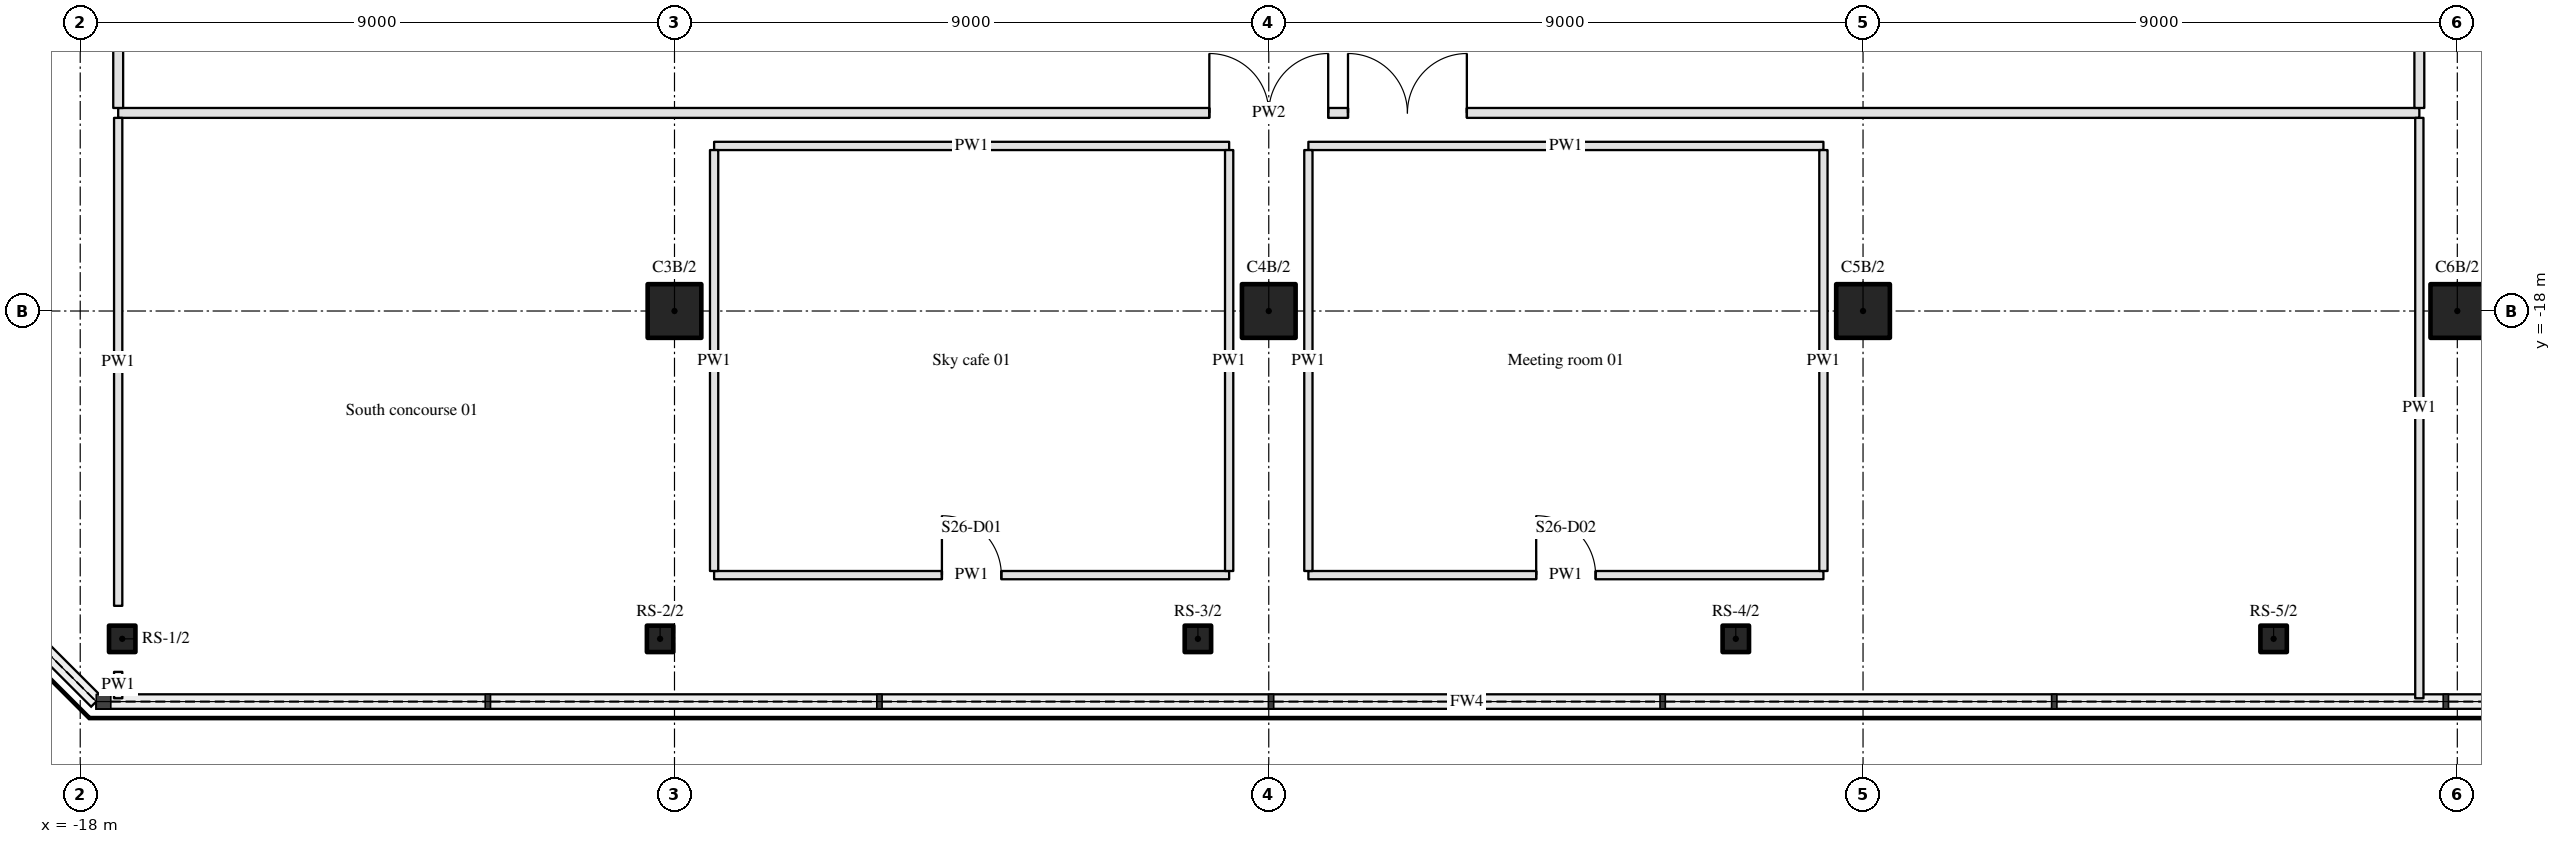
"""IFC4 building model, lengths in metres.
Left out: names, types, materials, properties, quantities, classifications, styles, units other than length and angle.
Written with IfcOpenShell. Run it as: python <this file> out.ifc"""

import sys

from ifc_helpers import new_model, si_unit, direction, frame, frame_2d, origin, origin_2d, place, context, subcontext, project, spatial, rectangle, hollow_rectangle, hollow_circle, extrude, element, fill, save


model = new_model("IFC4")
c1 = context("Model", 3, precision=1e-05, world=origin(), true_north=direction((0.0, 1.0)))
c2 = subcontext(c1, "Body", "Model", "MODEL_VIEW")
j1 = project(units=[si_unit("LENGTHUNIT", "METRE"), si_unit("PLANEANGLEUNIT", "RADIAN")], contexts=[c1])
p1 = place(None, origin())
s1 = spatial("IfcSite", under=j1, at=p1, CompositionType="ELEMENT")
p2 = place(p1, origin())
s2 = spatial("IfcBuilding", under=s1, at=p2, CompositionType="ELEMENT")
p3 = place(p2, frame((0.0, 0.0, 108.9)))
s3 = spatial("IfcBuildingStorey", under=s2, at=p3, CompositionType="ELEMENT", Elevation=108.9)
for number, where, z_axis, x_axis in (
    (1, (-9.0, -18.0, 0.0), (0.0, 0.0, 1.0), (1.0, 0.0, 0.0)),
    (2, (0.0, -18.0, 0.0), (0.0, 0.0, 1.0), (1.0, 0.0, 0.0)),
    (3, (9.0, -18.0, 0.0), (0.0, 0.0, 1.0), (1.0, 0.0, 0.0)),
    (4, (18.0, -18.0, 0.0), (0.0, 0.0, 1.0), (1.0, 0.0, 0.0)),
):
    element("IfcColumn", number, at=place(p3, frame(where, z_axis=z_axis, x_axis=x_axis)), inside=s3, PredefinedType="COLUMN", context=c2, shape_type="SweptSolid", body=[
        extrude(hollow_circle(Radius=0.406, WallThickness=0.036, at=origin_2d()), origin(), (0.0, 0.0, 1.0), 5.4),
    ])
for number, where, z_axis, x_axis in (
    (5, (-17.364, -22.965, 0.0), (0.0, 0.0, 1.0), (1.0, 0.0, 0.0)),
    (6, (-9.218, -22.965, 0.0), (0.0, 0.0, 1.0), (1.0, 0.0, 0.0)),
    (7, (-1.073, -22.965, 0.0), (0.0, 0.0, 1.0), (1.0, 0.0, 0.0)),
    (8, (7.073, -22.965, 0.0), (0.0, 0.0, 1.0), (1.0, 0.0, 0.0)),
    (9, (15.218, -22.965, 0.0), (0.0, 0.0, 1.0), (1.0, 0.0, 0.0)),
):
    element("IfcColumn", number, at=place(p3, frame(where, z_axis=z_axis, x_axis=x_axis)), inside=s3, PredefinedType="COLUMN", context=c2, shape_type="SweptSolid", body=[
        extrude(hollow_rectangle(XDim=0.4, YDim=0.4, WallThickness=0.025, InnerFilletRadius=0.038, OuterFilletRadius=0.062, at=origin_2d()), origin(), (0.0, 0.0, 1.0), 5.4),
    ])
p4 = place(p3, frame((-8.4, -22.0, 0.0), z_axis=(0.0, 0.0, 1.0), x_axis=(1.0, 0.0, 0.0)))
e10 = element("IfcWall", 10, at=p4, inside=s3, PredefinedType="PARTITIONING", context=c2, shape_type="SweptSolid", body=[
    extrude(rectangle(XDim=7.8, YDim=0.125, at=frame_2d((3.9, 0.0))), origin(), (0.0, 0.0, 1.0), 4.46),
])
p5 = place(p4, frame((3.45, 0.0, 0.0)))
e11 = element("IfcOpeningElement", 11, at=p5, cuts=e10, PredefinedType="OPENING", context=c2, shape_type="SweptSolid", body=[
    extrude(rectangle(XDim=0.9, YDim=2.1, at=frame_2d((0.45, 1.05))), frame((0.0, 0.073, 0.0), z_axis=(0.0, -1.0, 0.0), x_axis=(1.0, 0.0, 0.0)), (0.0, 0.0, 1.0), 0.145),
])
p6 = place(p3, frame((0.6, -22.0, 0.0), z_axis=(0.0, 0.0, 1.0), x_axis=(1.0, 0.0, 0.0)))
e12 = element("IfcWall", 12, at=p6, inside=s3, PredefinedType="PARTITIONING", context=c2, shape_type="SweptSolid", body=[
    extrude(rectangle(XDim=7.8, YDim=0.125, at=frame_2d((3.9, 0.0))), origin(), (0.0, 0.0, 1.0), 4.46),
])
p7 = place(p6, frame((3.45, 0.0, 0.0)))
e13 = element("IfcOpeningElement", 13, at=p7, cuts=e12, PredefinedType="OPENING", context=c2, shape_type="SweptSolid", body=[
    extrude(rectangle(XDim=0.9, YDim=2.1, at=frame_2d((0.45, 1.05))), frame((0.0, 0.073, 0.0), z_axis=(0.0, -1.0, 0.0), x_axis=(1.0, 0.0, 0.0)), (0.0, 0.0, 1.0), 0.145),
])
for number, where, z_axis, x_axis in (
    (14, (-8.4, -15.5, 0.0), (0.0, 0.0, 1.0), (1.0, 0.0, 0.0)),
    (15, (0.6, -15.5, 0.0), (0.0, 0.0, 1.0), (1.0, 0.0, 0.0)),
):
    element("IfcWall", number, at=place(p3, frame(where, z_axis=z_axis, x_axis=x_axis)), inside=s3, PredefinedType="PARTITIONING", context=c2, shape_type="SweptSolid", body=[
        extrude(rectangle(XDim=7.8, YDim=0.125, at=frame_2d((3.9, 0.0))), origin(), (0.0, 0.0, 1.0), 4.46),
    ])
p8 = place(p3, frame((-17.425, -15.0, 0.0), z_axis=(0.0, 0.0, 1.0), x_axis=(1.0, 0.0, 0.0)))
e16 = element("IfcWall", 16, at=p8, inside=s3, PredefinedType="PARTITIONING", context=c2, shape_type="SweptSolid", body=[
    extrude(rectangle(XDim=34.85, YDim=0.15, at=frame_2d((17.425, 0.0))), origin(), (0.0, 0.0, 1.0), 4.46),
])
p9 = place(p8, frame((16.525, 0.0, 0.0)))
e17 = element("IfcOpeningElement", 17, at=p9, cuts=e16, PredefinedType="OPENING", context=c2, shape_type="SweptSolid", body=[
    extrude(rectangle(XDim=1.8, YDim=2.1, at=frame_2d((0.9, 1.05))), frame((0.0, 0.085, 0.0), z_axis=(0.0, -1.0, 0.0), x_axis=(1.0, 0.0, 0.0)), (0.0, 0.0, 1.0), 0.17),
])
p10 = place(p8, frame((18.625, 0.0, 0.0)))
e18 = element("IfcOpeningElement", 18, at=p10, cuts=e16, PredefinedType="OPENING", context=c2, shape_type="SweptSolid", body=[
    extrude(rectangle(XDim=1.8, YDim=2.1, at=frame_2d((0.9, 1.05))), frame((0.0, 0.085, 0.0), z_axis=(0.0, -1.0, 0.0), x_axis=(1.0, 0.0, 0.0)), (0.0, 0.0, 1.0), 0.17),
])
p11 = place(p3, frame((-17.425, -23.865, 0.0), z_axis=(0.0, 0.0, 1.0), x_axis=(0.0, 1.0, 0.0)))
e19 = element("IfcWall", 19, at=p11, inside=s3, PredefinedType="PARTITIONING", context=c2, shape_type="SweptSolid", body=[
    extrude(rectangle(XDim=0.4, YDim=0.125, at=frame_2d((0.2, 0.0))), origin(), (0.0, 0.0, 1.0), 4.46),
])
p12 = place(p3, frame((-17.425, -22.465, 0.0), z_axis=(0.0, 0.0, 1.0), x_axis=(0.0, 1.0, 0.0)))
e20 = element("IfcWall", 20, at=p12, inside=s3, PredefinedType="PARTITIONING", context=c2, shape_type="SweptSolid", body=[
    extrude(rectangle(XDim=7.39, YDim=0.125, at=frame_2d((3.695, 0.0))), origin(), (0.0, 0.0, 1.0), 4.46),
])
p13 = place(p3, frame((-17.425, 8.35, 0.0), z_axis=(0.0, 0.0, 1.0), x_axis=(0.0, -1.0, 0.0)))
e21 = element("IfcWall", 21, at=p13, inside=s3, PredefinedType="PARTITIONING", context=c2, shape_type="SweptSolid", body=[
    extrude(rectangle(XDim=23.275, YDim=0.15, at=frame_2d((11.638, 0.0))), origin(), (0.0, 0.0, 1.0), 4.46),
])
p14 = place(p13, frame((11.913, 0.0, 0.0)))
e22 = element("IfcOpeningElement", 22, at=p14, cuts=e21, PredefinedType="OPENING", context=c2, shape_type="SweptSolid", body=[
    extrude(rectangle(XDim=1.8, YDim=2.1, at=frame_2d((0.9, 1.05))), frame((0.0, 0.085, 0.0), z_axis=(0.0, -1.0, 0.0), x_axis=(1.0, 0.0, 0.0)), (0.0, 0.0, 1.0), 0.17),
])
p15 = place(p13, frame((9.812, 0.0, 0.0)))
e23 = element("IfcOpeningElement", 23, at=p15, cuts=e21, PredefinedType="OPENING", context=c2, shape_type="SweptSolid", body=[
    extrude(rectangle(XDim=1.8, YDim=2.1, at=frame_2d((0.9, 1.05))), frame((0.0, 0.085, 0.0), z_axis=(0.0, -1.0, 0.0), x_axis=(1.0, 0.0, 0.0)), (0.0, 0.0, 1.0), 0.17),
])
for number, where, z_axis, x_axis in (
    (24, (-8.4, -21.938, 0.0), (0.0, 0.0, 1.0), (0.0, 1.0, 0.0)),
    (25, (-0.6, -21.938, 0.0), (0.0, 0.0, 1.0), (0.0, 1.0, 0.0)),
    (26, (0.6, -21.938, 0.0), (0.0, 0.0, 1.0), (0.0, 1.0, 0.0)),
    (27, (8.4, -21.938, 0.0), (0.0, 0.0, 1.0), (0.0, 1.0, 0.0)),
):
    element("IfcWall", number, at=place(p3, frame(where, z_axis=z_axis, x_axis=x_axis)), inside=s3, PredefinedType="PARTITIONING", context=c2, shape_type="SweptSolid", body=[
        extrude(rectangle(XDim=6.375, YDim=0.125, at=frame_2d((3.188, 0.0))), origin(), (0.0, 0.0, 1.0), 4.46),
    ])
p16 = place(p3, frame((17.425, -23.865, 0.0), z_axis=(0.0, 0.0, 1.0), x_axis=(0.0, 1.0, 0.0)))
e28 = element("IfcWall", 28, at=p16, inside=s3, PredefinedType="PARTITIONING", context=c2, shape_type="SweptSolid", body=[
    extrude(rectangle(XDim=8.79, YDim=0.125, at=frame_2d((4.395, 0.0))), origin(), (0.0, 0.0, 1.0), 4.46),
])
p17 = place(p3, frame((17.425, -14.925, 0.0), z_axis=(0.0, 0.0, 1.0), x_axis=(0.0, 1.0, 0.0)))
e29 = element("IfcWall", 29, at=p17, inside=s3, PredefinedType="PARTITIONING", context=c2, shape_type="SweptSolid", body=[
    extrude(rectangle(XDim=20.85, YDim=0.15, at=frame_2d((10.425, 0.0))), origin(), (0.0, 0.0, 1.0), 4.46),
])
p18 = place(p17, frame((9.525, 0.0, 0.0)))
e30 = element("IfcOpeningElement", 30, at=p18, cuts=e29, PredefinedType="OPENING", context=c2, shape_type="SweptSolid", body=[
    extrude(rectangle(XDim=1.8, YDim=2.1, at=frame_2d((0.9, 1.05))), frame((0.0, 0.085, 0.0), z_axis=(0.0, -1.0, 0.0), x_axis=(1.0, 0.0, 0.0)), (0.0, 0.0, 1.0), 0.17),
])
p19 = place(p17, frame((11.625, 0.0, 0.0)))
e31 = element("IfcOpeningElement", 31, at=p19, cuts=e29, PredefinedType="OPENING", context=c2, shape_type="SweptSolid", body=[
    extrude(rectangle(XDim=1.8, YDim=2.1, at=frame_2d((0.9, 1.05))), frame((0.0, 0.085, 0.0), z_axis=(0.0, -1.0, 0.0), x_axis=(1.0, 0.0, 0.0)), (0.0, 0.0, 1.0), 0.17),
])
p20 = place(p9, origin())
e32 = element("IfcDoor", 32, at=p20, inside=s3, OperationType="DOUBLE_DOOR_SINGLE_SWING", PredefinedType="DOOR", context=c2, shape_type="SweptSolid", body=[
    extrude(rectangle(XDim=1.8, YDim=2.1, at=frame_2d((0.9, 1.05))), frame((0.0, 0.025, 0.0), z_axis=(0.0, -1.0, 0.0), x_axis=(1.0, 0.0, 0.0)), (0.0, 0.0, 1.0), 0.05),
])
fill(e17, e32)
p21 = place(p10, origin())
e33 = element("IfcDoor", 33, at=p21, inside=s3, OperationType="DOUBLE_DOOR_SINGLE_SWING", PredefinedType="DOOR", context=c2, shape_type="SweptSolid", body=[
    extrude(rectangle(XDim=1.8, YDim=2.1, at=frame_2d((0.9, 1.05))), frame((0.0, 0.025, 0.0), z_axis=(0.0, -1.0, 0.0), x_axis=(1.0, 0.0, 0.0)), (0.0, 0.0, 1.0), 0.05),
])
fill(e18, e33)
p22 = place(p5, origin())
e34 = element("IfcDoor", 34, at=p22, inside=s3, OperationType="SINGLE_SWING_LEFT", PredefinedType="DOOR", context=c2, shape_type="SweptSolid", body=[
    extrude(rectangle(XDim=0.9, YDim=2.1, at=frame_2d((0.45, 1.05))), frame((0.0, 0.025, 0.0), z_axis=(0.0, -1.0, 0.0), x_axis=(1.0, 0.0, 0.0)), (0.0, 0.0, 1.0), 0.05),
])
fill(e11, e34)
p23 = place(p7, origin())
e35 = element("IfcDoor", 35, at=p23, inside=s3, OperationType="SINGLE_SWING_LEFT", PredefinedType="DOOR", context=c2, shape_type="SweptSolid", body=[
    extrude(rectangle(XDim=0.9, YDim=2.1, at=frame_2d((0.45, 1.05))), frame((0.0, 0.025, 0.0), z_axis=(0.0, -1.0, 0.0), x_axis=(1.0, 0.0, 0.0)), (0.0, 0.0, 1.0), 0.05),
])
fill(e13, e35)
save(model, sys.argv[1])
